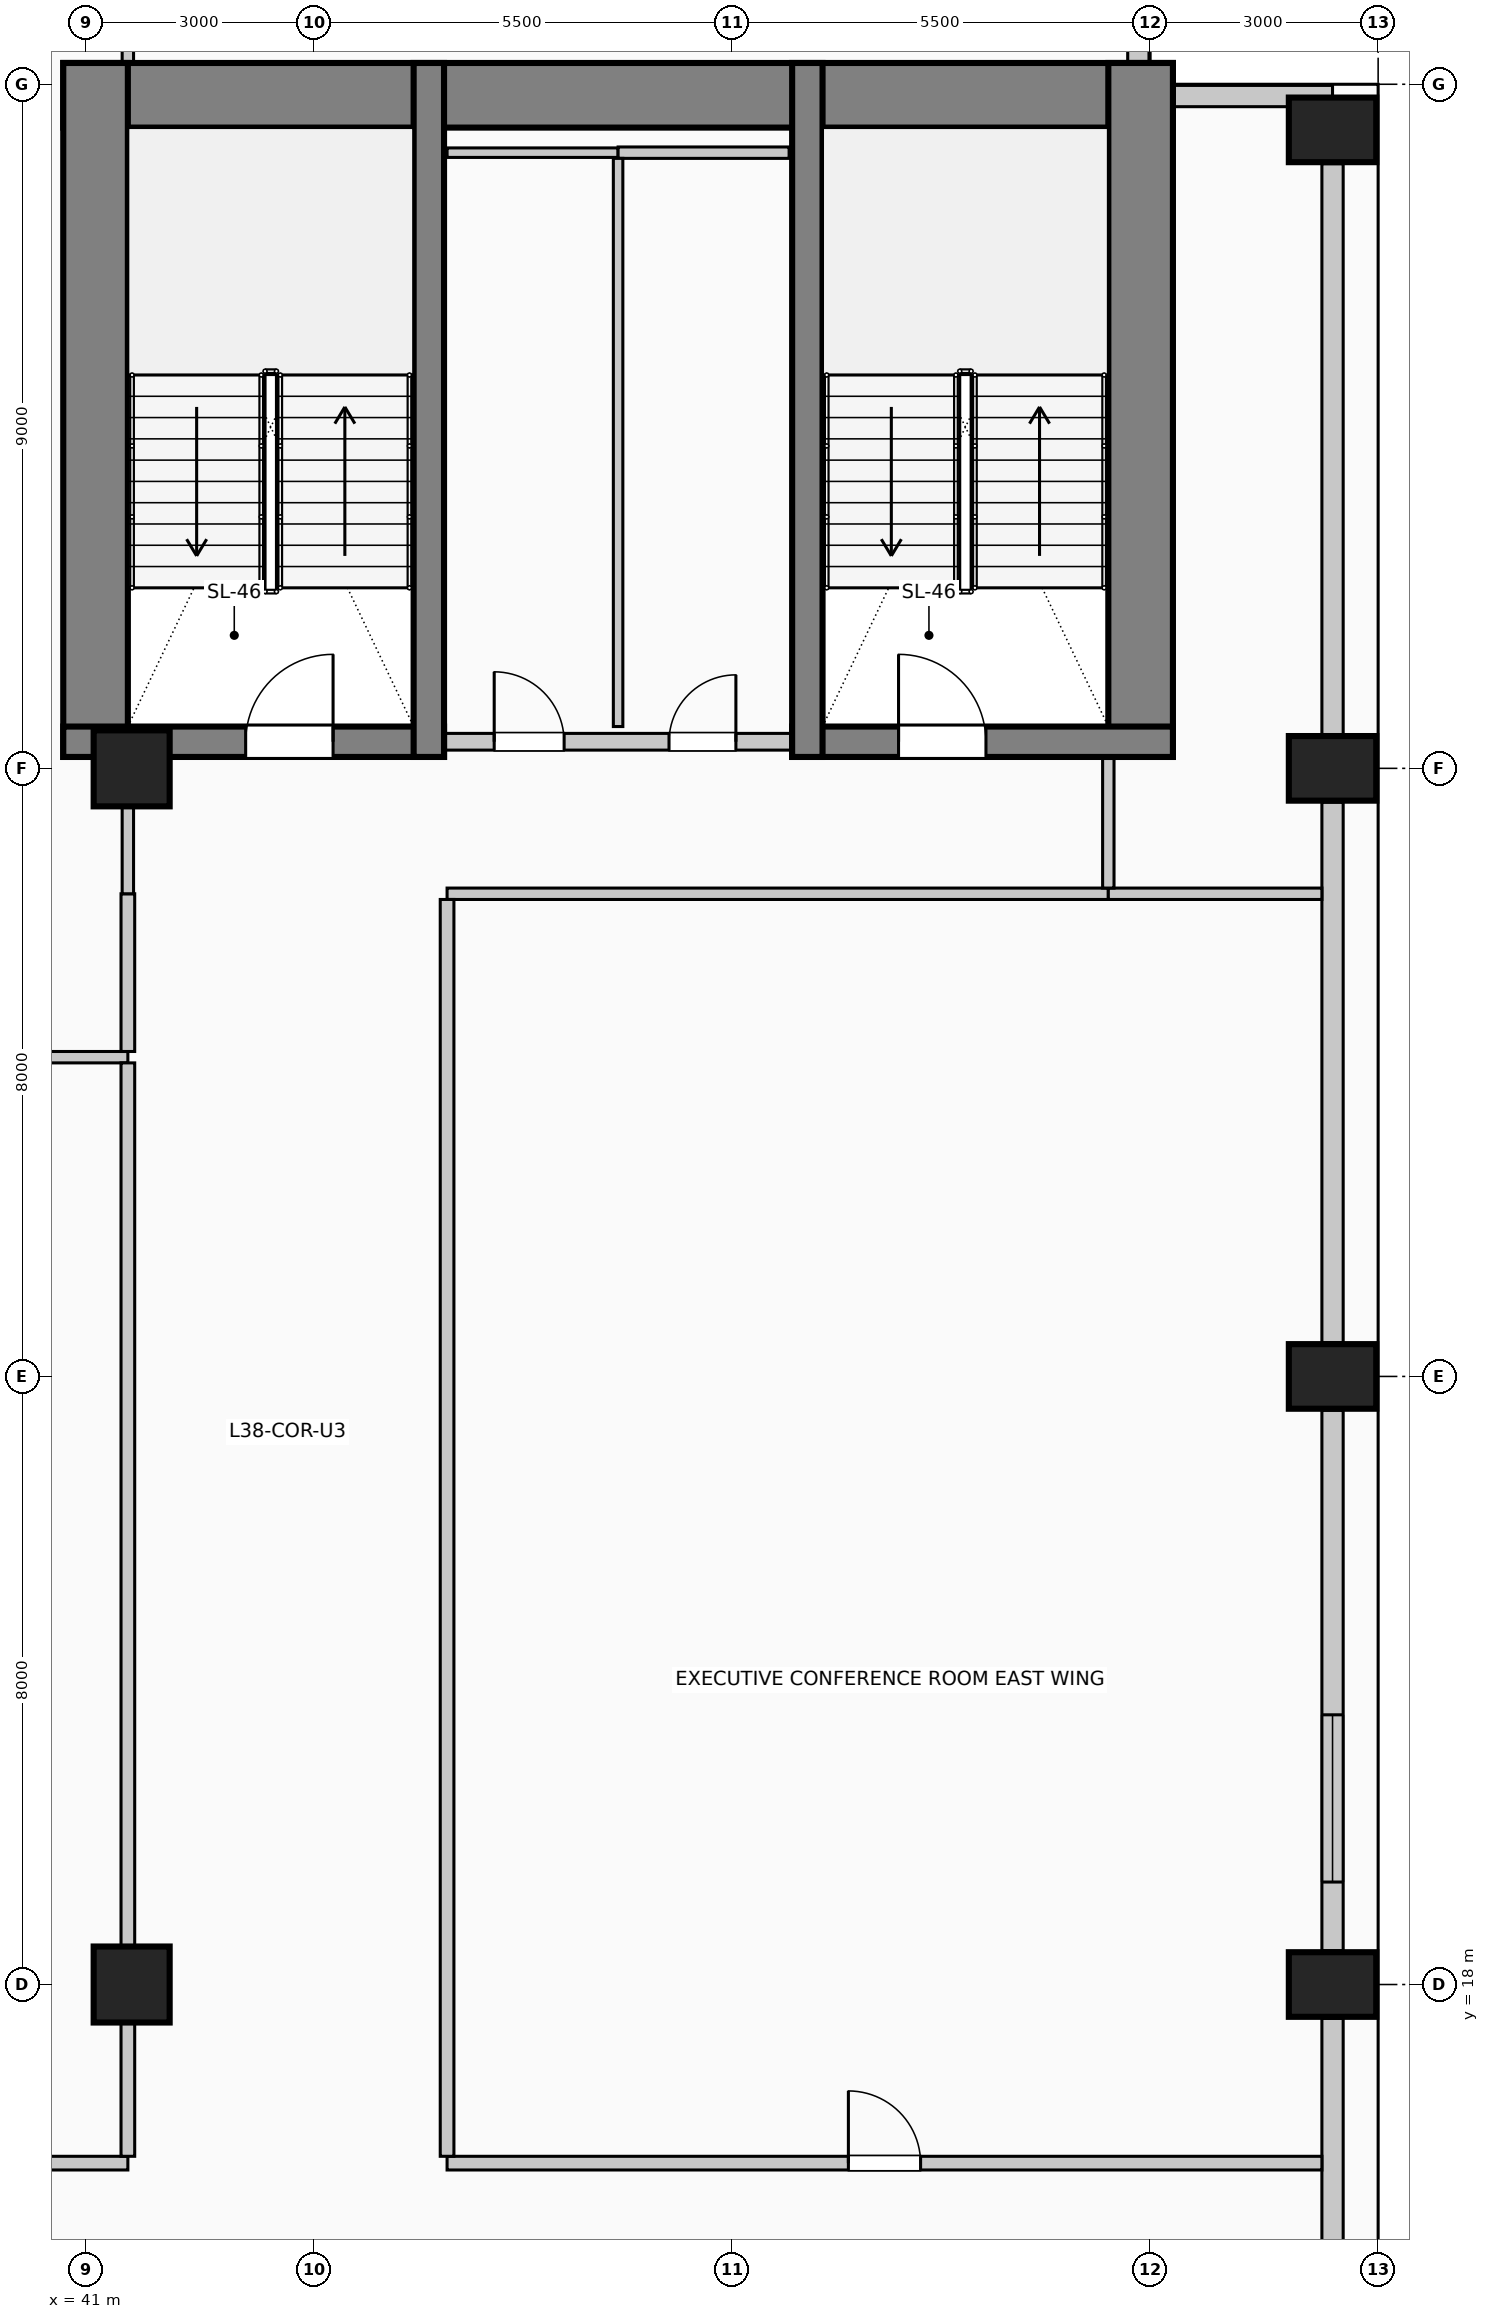
"""IFC4 building model, lengths in metres.
Left out: names, types, materials, properties, quantities, classifications, styles, units other than length and angle.
Written with IfcOpenShell. Run it as: python <this file> out.ifc"""

import sys

from ifc_helpers import new_model, si_unit, direction, frame, frame_2d, origin, origin_2d, place, context, subcontext, project, spatial, rectangle, circle, extrude, element, fill, save


model = new_model("IFC4")
c1 = context("Model", 3, precision=1e-05, world=origin(), true_north=direction((0.0, 1.0)))
c2 = subcontext(c1, "Body", "Model", "MODEL_VIEW")
j1 = project(units=[si_unit("LENGTHUNIT", "METRE"), si_unit("PLANEANGLEUNIT", "RADIAN")], contexts=[c1])
p1 = place(None, origin())
s1 = spatial("IfcSite", under=j1, at=p1, CompositionType="ELEMENT")
p2 = place(p1, origin())
s2 = spatial("IfcBuilding", under=s1, at=p2, CompositionType="ELEMENT")
p3 = place(p2, frame((0.0, 0.0, 156.6)))
s3 = spatial("IfcBuildingStorey", under=s2, at=p3, CompositionType="ELEMENT", Elevation=156.6)
p4 = place(p3, frame((40.7, 42.855, 0.0), z_axis=(0.0, 0.0, 1.0), x_axis=(1.0, 0.0, 0.0)))
e1 = element("IfcWall", 1, at=p4, inside=s3, PredefinedType="SHEAR", context=c2, shape_type="SweptSolid", body=[
    extrude(rectangle(XDim=14.6, YDim=0.85, at=frame_2d((7.3, 0.0))), origin(), (0.0, 0.0, 1.0), 4.0),
])
for number, where, z_axis, x_axis in (
    (2, (41.125, 34.15, 0.0), (0.0, 0.0, 1.0), (0.0, 1.0, 0.0)),
    (3, (54.875, 34.15, 0.0), (0.0, 0.0, 1.0), (0.0, 1.0, 0.0)),
):
    element("IfcWall", number, at=place(p3, frame(where, z_axis=z_axis, x_axis=x_axis)), inside=s3, PredefinedType="SHEAR", context=c2, shape_type="SweptSolid", body=[
        extrude(rectangle(XDim=9.13, YDim=0.85, at=frame_2d((4.565, 0.0))), origin(), (0.0, 0.0, 1.0), 4.0),
    ])
p5 = place(p3, frame((40.7, 34.35, 0.0), z_axis=(0.0, 0.0, 1.0), x_axis=(1.0, 0.0, 0.0)))
e4 = element("IfcWall", 4, at=p5, inside=s3, PredefinedType="SHEAR", context=c2, shape_type="SweptSolid", body=[
    extrude(rectangle(XDim=5.01, YDim=0.4, at=frame_2d((2.505, 0.0))), origin(), (0.0, 0.0, 1.0), 4.0),
])
p6 = place(p5, frame((2.4, 0.0, 0.0)))
e5 = element("IfcOpeningElement", 5, at=p6, cuts=e4, PredefinedType="OPENING", context=c2, shape_type="SweptSolid", body=[
    extrude(rectangle(XDim=1.15, YDim=2.2, at=frame_2d((0.575, 1.1))), frame((0.0, 0.21, 0.0), z_axis=(0.0, -1.0, 0.0), x_axis=(1.0, 0.0, 0.0)), (0.0, 0.0, 1.0), 0.42),
])
p7 = place(p3, frame((45.51, 34.15, 0.0), z_axis=(0.0, 0.0, 1.0), x_axis=(0.0, 1.0, 0.0)))
e6 = element("IfcWall", 6, at=p7, inside=s3, PredefinedType="SHEAR", context=c2, shape_type="SweptSolid", body=[
    extrude(rectangle(XDim=9.13, YDim=0.4, at=frame_2d((4.565, 0.0))), origin(), (0.0, 0.0, 1.0), 4.0),
])
p8 = place(p3, frame((50.29, 34.35, 0.0), z_axis=(0.0, 0.0, 1.0), x_axis=(1.0, 0.0, 0.0)))
e7 = element("IfcWall", 7, at=p8, inside=s3, PredefinedType="SHEAR", context=c2, shape_type="SweptSolid", body=[
    extrude(rectangle(XDim=5.01, YDim=0.4, at=frame_2d((2.505, 0.0))), origin(), (0.0, 0.0, 1.0), 4.0),
])
p9 = place(p8, frame((1.4, 0.0, 0.0)))
e8 = element("IfcOpeningElement", 8, at=p9, cuts=e7, PredefinedType="OPENING", context=c2, shape_type="SweptSolid", body=[
    extrude(rectangle(XDim=1.15, YDim=2.2, at=frame_2d((0.575, 1.1))), frame((0.0, 0.21, 0.0), z_axis=(0.0, -1.0, 0.0), x_axis=(1.0, 0.0, 0.0)), (0.0, 0.0, 1.0), 0.42),
])
p10 = place(p3, frame((50.49, 34.15, 0.0), z_axis=(0.0, 0.0, 1.0), x_axis=(0.0, 1.0, 0.0)))
e9 = element("IfcWall", 9, at=p10, inside=s3, PredefinedType="SHEAR", context=c2, shape_type="SweptSolid", body=[
    extrude(rectangle(XDim=9.13, YDim=0.4, at=frame_2d((4.565, 0.0))), origin(), (0.0, 0.0, 1.0), 4.0),
])
for number, where, z_axis, x_axis in (
    (10, (57.4, 18.0, 0.0), (0.0, 0.0, 1.0), (0.0, 1.0, 0.0)),
    (11, (57.4, 26.0, 0.0), (0.0, 0.0, 1.0), (0.0, 1.0, 0.0)),
    (12, (57.4, 34.0, 0.0), (0.0, 0.0, 1.0), (0.0, 1.0, 0.0)),
    (13, (57.4, 42.4, 0.0), (0.0, 0.0, 1.0), (0.0, 1.0, 0.0)),
):
    element("IfcColumn", number, at=place(p3, frame(where, z_axis=z_axis, x_axis=x_axis)), inside=s3, PredefinedType="COLUMN", context=c2, shape_type="SweptSolid", body=[
        extrude(rectangle(XDim=0.85, YDim=1.15, at=origin_2d()), origin(), (0.0, 0.0, 1.0), 4.0),
    ])
for number, where, z_axis, x_axis in (
    (14, (41.6, 18.0, 0.0), (0.0, 0.0, 1.0), (1.0, 0.0, 0.0)),
    (15, (41.6, 34.0, 0.0), (0.0, 0.0, 1.0), (1.0, 0.0, 0.0)),
):
    element("IfcColumn", number, at=place(p3, frame(where, z_axis=z_axis, x_axis=x_axis)), inside=s3, PredefinedType="COLUMN", context=c2, shape_type="SweptSolid", body=[
        extrude(circle(Radius=0.5, at=origin_2d()), origin(), (0.0, 0.0, 1.0), 4.0),
    ])
p11 = place(p3, frame((57.4, 17.555, 0.0), z_axis=(0.0, 0.0, 1.0), x_axis=(0.0, -1.0, 0.0)))
e16 = element("IfcWall", 16, at=p11, inside=s3, PredefinedType="SOLIDWALL", context=c2, shape_type="SweptSolid", body=[
    extrude(rectangle(XDim=7.11, YDim=0.28, at=frame_2d((3.555, 0.0))), origin(), (0.0, 0.0, 1.0), 2.81),
])
p12 = place(p3, frame((57.4, 25.555, 0.0), z_axis=(0.0, 0.0, 1.0), x_axis=(0.0, -1.0, 0.0)))
e17 = element("IfcWall", 17, at=p12, inside=s3, PredefinedType="SOLIDWALL", context=c2, shape_type="SweptSolid", body=[
    extrude(rectangle(XDim=7.11, YDim=0.28, at=frame_2d((3.555, 0.0))), origin(), (0.0, 0.0, 1.0), 2.81),
])
p13 = place(p12, frame((4.007, 0.0, 0.5)))
e18 = element("IfcOpeningElement", 18, at=p13, cuts=e17, PredefinedType="OPENING", context=c2, shape_type="SweptSolid", body=[
    extrude(rectangle(XDim=2.2, YDim=1.95, at=frame_2d((1.1, 0.975))), frame((0.0, 0.15, 0.0), z_axis=(0.0, -1.0, 0.0), x_axis=(1.0, 0.0, 0.0)), (0.0, 0.0, 1.0), 0.3),
])
p14 = place(p3, frame((57.4, 33.555, 0.0), z_axis=(0.0, 0.0, 1.0), x_axis=(0.0, -1.0, 0.0)))
e19 = element("IfcWall", 19, at=p14, inside=s3, PredefinedType="SOLIDWALL", context=c2, shape_type="SweptSolid", body=[
    extrude(rectangle(XDim=7.11, YDim=0.28, at=frame_2d((3.555, 0.0))), origin(), (0.0, 0.0, 1.0), 2.81),
])
p15 = place(p3, frame((57.4, 41.955, 0.0), z_axis=(0.0, 0.0, 1.0), x_axis=(0.0, -1.0, 0.0)))
e20 = element("IfcWall", 20, at=p15, inside=s3, PredefinedType="SOLIDWALL", context=c2, shape_type="SweptSolid", body=[
    extrude(rectangle(XDim=7.51, YDim=0.28, at=frame_2d((3.755, 0.0))), origin(), (0.0, 0.0, 1.0), 2.81),
])
p16 = place(p3, frame((54.845, 45.4, 0.0), z_axis=(0.0, 0.0, 1.0), x_axis=(0.0, -1.0, 0.0)))
e21 = element("IfcWall", 21, at=p16, inside=s3, PredefinedType="SOLIDWALL", context=c2, shape_type="SweptSolid", body=[
    extrude(rectangle(XDim=2.115, YDim=0.28, at=frame_2d((1.058, 0.0))), origin(), (0.0, 0.0, 1.0), 3.66),
])
p17 = place(p3, frame((55.305, 42.845, 0.0), z_axis=(0.0, 0.0, 1.0), x_axis=(1.0, 0.0, 0.0)))
e22 = element("IfcWall", 22, at=p17, inside=s3, PredefinedType="SOLIDWALL", context=c2, shape_type="SweptSolid", body=[
    extrude(rectangle(XDim=2.095, YDim=0.28, at=frame_2d((1.047, 0.0))), origin(), (0.0, 0.0, 1.0), 3.66),
])
p18 = place(p3, frame((45.72, 34.35, 0.0), z_axis=(0.0, 0.0, 1.0), x_axis=(1.0, 0.0, 0.0)))
e23 = element("IfcWall", 23, at=p18, inside=s3, PredefinedType="PARTITIONING", context=c2, shape_type="SweptSolid", body=[
    extrude(rectangle(XDim=4.56, YDim=0.22, at=frame_2d((2.28, 0.0))), origin(), (0.0, 0.0, 1.0), 3.66),
])
p19 = place(p18, frame((0.65, 0.0, 0.0)))
e24 = element("IfcOpeningElement", 24, at=p19, cuts=e23, PredefinedType="OPENING", context=c2, shape_type="SweptSolid", body=[
    extrude(rectangle(XDim=0.92, YDim=2.1, at=frame_2d((0.46, 1.05))), frame((0.0, 0.12, 0.0), z_axis=(0.0, -1.0, 0.0), x_axis=(1.0, 0.0, 0.0)), (0.0, 0.0, 1.0), 0.24),
])
p20 = place(p18, frame((2.95, 0.0, 0.0)))
e25 = element("IfcOpeningElement", 25, at=p20, cuts=e23, PredefinedType="OPENING", context=c2, shape_type="SweptSolid", body=[
    extrude(rectangle(XDim=0.88, YDim=2.1, at=frame_2d((0.44, 1.05))), frame((0.0, 0.12, 0.0), z_axis=(0.0, -1.0, 0.0), x_axis=(1.0, 0.0, 0.0)), (0.0, 0.0, 1.0), 0.24),
])
p21 = place(p3, frame((22.4, 15.65, 0.0), z_axis=(0.0, 0.0, 1.0), x_axis=(1.0, 0.0, 0.0)))
e26 = element("IfcWall", 26, at=p21, inside=s3, PredefinedType="PARTITIONING", context=c2, shape_type="SweptSolid", body=[
    extrude(rectangle(XDim=19.15, YDim=0.18, at=frame_2d((9.575, 0.0))), origin(), (0.0, 0.0, 1.0), 3.66),
])
p22 = place(p21, frame((9.05, 0.0, 0.0)))
e27 = element("IfcOpeningElement", 27, at=p22, cuts=e26, PredefinedType="OPENING", context=c2, shape_type="SweptSolid", body=[
    extrude(rectangle(XDim=1.05, YDim=2.15, at=frame_2d((0.525, 1.075))), frame((0.0, 0.1, 0.0), z_axis=(0.0, -1.0, 0.0), x_axis=(1.0, 0.0, 0.0)), (0.0, 0.0, 1.0), 0.2),
])
p23 = place(p3, frame((45.75, 15.65, 0.0), z_axis=(0.0, 0.0, 1.0), x_axis=(1.0, 0.0, 0.0)))
e28 = element("IfcWall", 28, at=p23, inside=s3, PredefinedType="PARTITIONING", context=c2, shape_type="SweptSolid", body=[
    extrude(rectangle(XDim=11.51, YDim=0.18, at=frame_2d((5.755, 0.0))), origin(), (0.0, 0.0, 1.0), 3.66),
])
p24 = place(p23, frame((5.28, 0.0, 0.0)))
e29 = element("IfcOpeningElement", 29, at=p24, cuts=e28, PredefinedType="OPENING", context=c2, shape_type="SweptSolid", body=[
    extrude(rectangle(XDim=0.95, YDim=2.15, at=frame_2d((0.475, 1.075))), frame((0.0, 0.1, 0.0), z_axis=(0.0, -1.0, 0.0), x_axis=(1.0, 0.0, 0.0)), (0.0, 0.0, 1.0), 0.2),
])
p25 = place(p3, frame((22.4, 30.2, 0.0), z_axis=(0.0, 0.0, 1.0), x_axis=(1.0, 0.0, 0.0)))
e30 = element("IfcWall", 30, at=p25, inside=s3, PredefinedType="PARTITIONING", context=c2, shape_type="SweptSolid", body=[
    extrude(rectangle(XDim=19.15, YDim=0.15, at=frame_2d((9.575, 0.0))), origin(), (0.0, 0.0, 1.0), 3.66),
])
p26 = place(p3, frame((45.75, 32.35, 0.0), z_axis=(0.0, 0.0, 1.0), x_axis=(1.0, 0.0, 0.0)))
e31 = element("IfcWall", 31, at=p26, inside=s3, PredefinedType="PARTITIONING", context=c2, shape_type="SweptSolid", body=[
    extrude(rectangle(XDim=8.7, YDim=0.15, at=frame_2d((4.35, 0.0))), origin(), (0.0, 0.0, 1.0), 3.66),
])
p27 = place(p3, frame((54.45, 32.35, 0.0), z_axis=(0.0, 0.0, 1.0), x_axis=(1.0, 0.0, 0.0)))
e32 = element("IfcWall", 32, at=p27, inside=s3, PredefinedType="PARTITIONING", context=c2, shape_type="SweptSolid", body=[
    extrude(rectangle(XDim=2.81, YDim=0.15, at=frame_2d((1.405, 0.0))), origin(), (0.0, 0.0, 1.0), 3.66),
])
p28 = place(p3, frame((45.75, 42.1, 0.0), z_axis=(0.0, 0.0, 1.0), x_axis=(1.0, 0.0, 0.0)))
e33 = element("IfcWall", 33, at=p28, inside=s3, PredefinedType="PARTITIONING", context=c2, shape_type="SweptSolid", body=[
    extrude(rectangle(XDim=2.25, YDim=0.125, at=frame_2d((1.125, 0.0))), origin(), (0.0, 0.0, 1.0), 3.66),
])
p29 = place(p3, frame((48.0, 42.1, 0.0), z_axis=(0.0, 0.0, 1.0), x_axis=(1.0, 0.0, 0.0)))
e34 = element("IfcWall", 34, at=p29, inside=s3, PredefinedType="PARTITIONING", context=c2, shape_type="SweptSolid", body=[
    extrude(rectangle(XDim=2.25, YDim=0.15, at=frame_2d((1.125, 0.0))), origin(), (0.0, 0.0, 1.0), 3.66),
])
p30 = place(p3, frame((41.55, 15.74, 0.0), z_axis=(0.0, 0.0, 1.0), x_axis=(0.0, 1.0, 0.0)))
e35 = element("IfcWall", 35, at=p30, inside=s3, PredefinedType="PARTITIONING", context=c2, shape_type="SweptSolid", body=[
    extrude(rectangle(XDim=1.76, YDim=0.18, at=frame_2d((0.88, 0.0))), origin(), (0.0, 0.0, 1.0), 3.005),
])
p31 = place(p3, frame((41.55, 18.5, 0.0), z_axis=(0.0, 0.0, 1.0), x_axis=(0.0, 1.0, 0.0)))
e36 = element("IfcWall", 36, at=p31, inside=s3, PredefinedType="PARTITIONING", context=c2, shape_type="SweptSolid", body=[
    extrude(rectangle(XDim=11.625, YDim=0.18, at=frame_2d((5.812, 0.0))), origin(), (0.0, 0.0, 1.0), 3.005),
])
p32 = place(p3, frame((41.55, 30.275, 0.0), z_axis=(0.0, 0.0, 1.0), x_axis=(0.0, 1.0, 0.0)))
e37 = element("IfcWall", 37, at=p32, inside=s3, PredefinedType="PARTITIONING", context=c2, shape_type="SweptSolid", body=[
    extrude(rectangle(XDim=2.075, YDim=0.18, at=frame_2d((1.038, 0.0))), origin(), (0.0, 0.0, 1.0), 3.005),
])
p33 = place(p3, frame((41.55, 32.35, 0.0), z_axis=(0.0, 0.0, 1.0), x_axis=(0.0, 1.0, 0.0)))
e38 = element("IfcWall", 38, at=p33, inside=s3, PredefinedType="PARTITIONING", context=c2, shape_type="SweptSolid", body=[
    extrude(rectangle(XDim=1.15, YDim=0.15, at=frame_2d((0.575, 0.0))), origin(), (0.0, 0.0, 1.0), 3.005),
])
p34 = place(p3, frame((41.55, 43.28, 0.0), z_axis=(0.0, 0.0, 1.0), x_axis=(0.0, 1.0, 0.0)))
e39 = element("IfcWall", 39, at=p34, inside=s3, PredefinedType="PARTITIONING", context=c2, shape_type="SweptSolid", body=[
    extrude(rectangle(XDim=1.42, YDim=0.15, at=frame_2d((0.71, 0.0))), origin(), (0.0, 0.0, 1.0), 3.66),
])
p35 = place(p3, frame((45.75, 15.74, 0.0), z_axis=(0.0, 0.0, 1.0), x_axis=(0.0, 1.0, 0.0)))
e40 = element("IfcWall", 40, at=p35, inside=s3, PredefinedType="PARTITIONING", context=c2, shape_type="SweptSolid", body=[
    extrude(rectangle(XDim=16.535, YDim=0.18, at=frame_2d((8.268, 0.0))), origin(), (0.0, 0.0, 1.0), 3.66),
])
p36 = place(p3, frame((48.0, 34.55, 0.0), z_axis=(0.0, 0.0, 1.0), x_axis=(0.0, 1.0, 0.0)))
e41 = element("IfcWall", 41, at=p36, inside=s3, PredefinedType="PARTITIONING", context=c2, shape_type="SweptSolid", body=[
    extrude(rectangle(XDim=7.475, YDim=0.125, at=frame_2d((3.737, 0.0))), origin(), (0.0, 0.0, 1.0), 3.66),
])
p37 = place(p3, frame((54.45, 32.425, 0.0), z_axis=(0.0, 0.0, 1.0), x_axis=(0.0, 1.0, 0.0)))
e42 = element("IfcWall", 42, at=p37, inside=s3, PredefinedType="PARTITIONING", context=c2, shape_type="SweptSolid", body=[
    extrude(rectangle(XDim=1.725, YDim=0.15, at=frame_2d((0.862, 0.0))), origin(), (0.0, 0.0, 1.0), 3.66),
])
p38 = place(p13, origin())
e43 = element("IfcWindow", 43, at=p38, inside=s3, PartitioningType="SINGLE_PANEL", PredefinedType="WINDOW", context=c2, shape_type="SweptSolid", body=[
    extrude(rectangle(XDim=2.2, YDim=1.95, at=frame_2d((1.1, 0.975))), frame((0.0, 0.03, 0.0), z_axis=(0.0, -1.0, 0.0), x_axis=(1.0, 0.0, 0.0)), (0.0, 0.0, 1.0), 0.06),
])
fill(e18, e43)
p39 = place(p6, origin())
e44 = element("IfcDoor", 44, at=p39, inside=s3, OperationType="SINGLE_SWING_RIGHT", PredefinedType="DOOR", context=c2, shape_type="SweptSolid", body=[
    extrude(rectangle(XDim=1.15, YDim=2.2, at=frame_2d((0.575, 1.1))), frame((0.0, 0.025, 0.0), z_axis=(0.0, -1.0, 0.0), x_axis=(1.0, 0.0, 0.0)), (0.0, 0.0, 1.0), 0.05),
])
fill(e5, e44)
p40 = place(p19, origin())
e45 = element("IfcDoor", 45, at=p40, inside=s3, OperationType="SINGLE_SWING_LEFT", PredefinedType="DOOR", context=c2, shape_type="SweptSolid", body=[
    extrude(rectangle(XDim=0.92, YDim=2.1, at=frame_2d((0.46, 1.05))), frame((0.0, 0.025, 0.0), z_axis=(0.0, -1.0, 0.0), x_axis=(1.0, 0.0, 0.0)), (0.0, 0.0, 1.0), 0.05),
])
fill(e24, e45)
p41 = place(p20, origin())
e46 = element("IfcDoor", 46, at=p41, inside=s3, OperationType="SINGLE_SWING_RIGHT", PredefinedType="DOOR", context=c2, shape_type="SweptSolid", body=[
    extrude(rectangle(XDim=0.88, YDim=2.1, at=frame_2d((0.44, 1.05))), frame((0.0, 0.025, 0.0), z_axis=(0.0, -1.0, 0.0), x_axis=(1.0, 0.0, 0.0)), (0.0, 0.0, 1.0), 0.05),
])
fill(e25, e46)
p42 = place(p9, origin())
e47 = element("IfcDoor", 47, at=p42, inside=s3, OperationType="SINGLE_SWING_LEFT", PredefinedType="DOOR", context=c2, shape_type="SweptSolid", body=[
    extrude(rectangle(XDim=1.15, YDim=2.2, at=frame_2d((0.575, 1.1))), frame((0.0, 0.025, 0.0), z_axis=(0.0, -1.0, 0.0), x_axis=(1.0, 0.0, 0.0)), (0.0, 0.0, 1.0), 0.05),
])
fill(e8, e47)
p43 = place(p24, origin())
e48 = element("IfcDoor", 48, at=p43, inside=s3, OperationType="SINGLE_SWING_LEFT", PredefinedType="DOOR", context=c2, shape_type="SweptSolid", body=[
    extrude(rectangle(XDim=0.95, YDim=2.15, at=frame_2d((0.475, 1.075))), frame((0.0, 0.025, 0.0), z_axis=(0.0, -1.0, 0.0), x_axis=(1.0, 0.0, 0.0)), (0.0, 0.0, 1.0), 0.05),
])
fill(e29, e48)
save(model, sys.argv[1])
